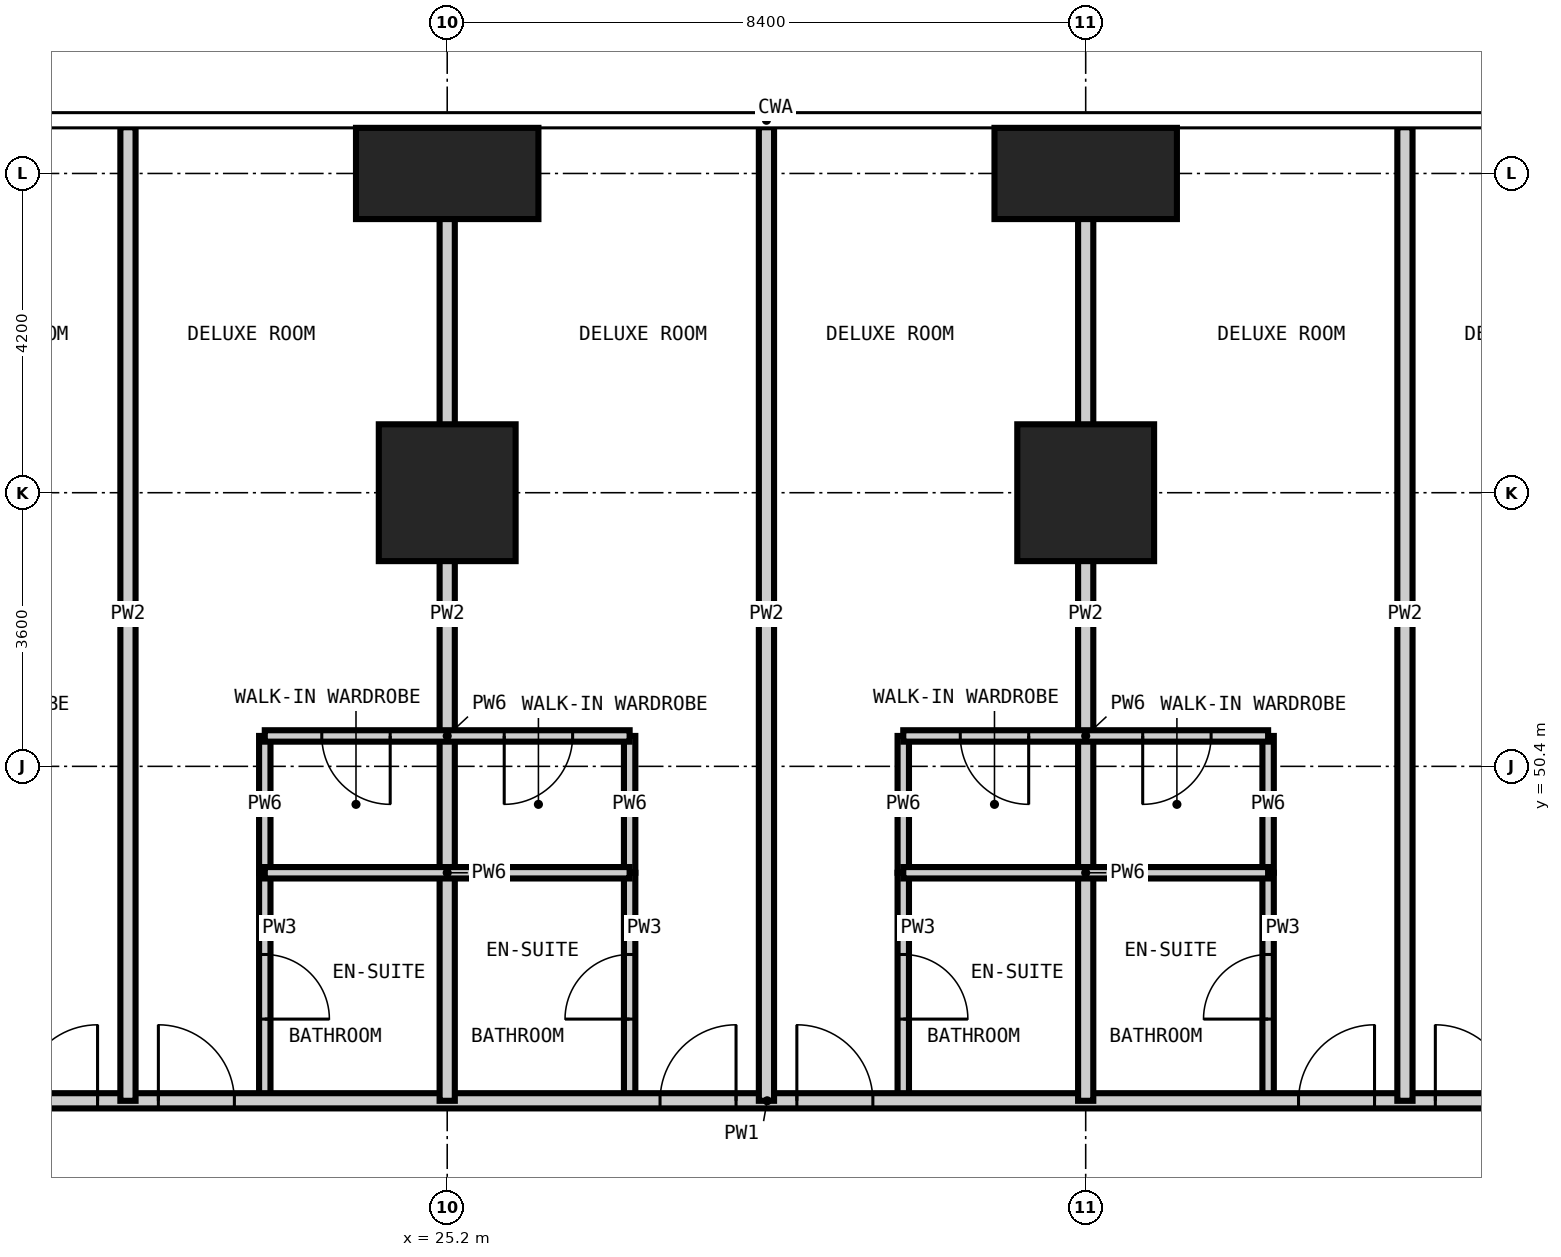
"""IFC4 building model, lengths in metres.
Left out: names, types, materials, properties, quantities, classifications, styles, units other than length and angle.
Written with IfcOpenShell. Run it as: python <this file> out.ifc"""

import sys

from ifc_helpers import new_model, si_unit, direction, frame, frame_2d, origin, origin_2d, place, context, subcontext, project, spatial, rectangle, extrude, element, fill, save


model = new_model("IFC4")
c1 = context("Model", 3, precision=1e-05, world=origin(), true_north=direction((0.0, 1.0)))
c2 = subcontext(c1, "Body", "Model", "MODEL_VIEW")
j1 = project(units=[si_unit("LENGTHUNIT", "METRE"), si_unit("PLANEANGLEUNIT", "RADIAN")], contexts=[c1])
p1 = place(None, origin())
s1 = spatial("IfcSite", under=j1, at=p1, CompositionType="ELEMENT")
p2 = place(p1, origin())
s2 = spatial("IfcBuilding", under=s1, at=p2, CompositionType="ELEMENT")
p3 = place(p2, frame((0.0, 0.0, 27.0)))
s3 = spatial("IfcBuildingStorey", under=s2, at=p3, CompositionType="ELEMENT", Elevation=27.0)
p4 = place(p3, frame((25.2, 54.0, -0.35), z_axis=(0.0, 0.0, 1.0), x_axis=(1.0, 0.0, 0.0)))
e1 = element("IfcColumn", 1, at=p4, inside=s3, PredefinedType="COLUMN", context=c2, shape_type="SweptSolid", body=[
    extrude(rectangle(XDim=1.8, YDim=1.8, at=origin_2d()), origin(), (0.0, 0.0, 1.0), 3.6),
])
p5 = place(p3, frame((25.2, 58.2, -0.35), z_axis=(0.0, 0.0, 1.0), x_axis=(1.0, 0.0, 0.0)))
e2 = element("IfcColumn", 2, at=p5, inside=s3, PredefinedType="COLUMN", context=c2, shape_type="SweptSolid", body=[
    extrude(rectangle(XDim=2.4, YDim=1.2, at=origin_2d()), origin(), (0.0, 0.0, 1.0), 3.6),
])
p6 = place(p3, frame((33.6, 54.0, -0.35), z_axis=(0.0, 0.0, 1.0), x_axis=(1.0, 0.0, 0.0)))
e3 = element("IfcColumn", 3, at=p6, inside=s3, PredefinedType="COLUMN", context=c2, shape_type="SweptSolid", body=[
    extrude(rectangle(XDim=1.8, YDim=1.8, at=origin_2d()), origin(), (0.0, 0.0, 1.0), 3.6),
])
p7 = place(p3, frame((33.6, 58.2, -0.35), z_axis=(0.0, 0.0, 1.0), x_axis=(1.0, 0.0, 0.0)))
e4 = element("IfcColumn", 4, at=p7, inside=s3, PredefinedType="COLUMN", context=c2, shape_type="SweptSolid", body=[
    extrude(rectangle(XDim=2.4, YDim=1.2, at=origin_2d()), origin(), (0.0, 0.0, 1.0), 3.6),
])
p8 = place(p3, frame((22.8, 46.0, 0.0), z_axis=(0.0, 0.0, 1.0), x_axis=(0.0, 1.0, 0.0)))
e5 = element("IfcWall", 5, at=p8, inside=s3, PredefinedType="PARTITIONING", context=c2, shape_type="SweptSolid", body=[
    extrude(rectangle(XDim=3.0, YDim=0.15, at=frame_2d((1.5, 0.0))), origin(), (0.0, 0.0, 1.0), 3.25),
])
p9 = place(p8, frame((1.075, 0.0, 0.0)))
e6 = element("IfcOpeningElement", 6, at=p9, cuts=e5, PredefinedType="OPENING", context=c2, shape_type="SweptSolid", body=[
    extrude(rectangle(XDim=0.85, YDim=2.1, at=frame_2d((0.425, 1.05))), frame((0.0, 0.085, 0.0), z_axis=(0.0, -1.0, 0.0), x_axis=(1.0, 0.0, 0.0)), (0.0, 0.0, 1.0), 0.17),
])
p10 = place(p3, frame((27.6, 46.0, 0.0), z_axis=(0.0, 0.0, 1.0), x_axis=(0.0, 1.0, 0.0)))
e7 = element("IfcWall", 7, at=p10, inside=s3, PredefinedType="PARTITIONING", context=c2, shape_type="SweptSolid", body=[
    extrude(rectangle(XDim=3.0, YDim=0.15, at=frame_2d((1.5, 0.0))), origin(), (0.0, 0.0, 1.0), 3.25),
])
p11 = place(p10, frame((1.075, 0.0, 0.0)))
e8 = element("IfcOpeningElement", 8, at=p11, cuts=e7, PredefinedType="OPENING", context=c2, shape_type="SweptSolid", body=[
    extrude(rectangle(XDim=0.85, YDim=2.1, at=frame_2d((0.425, 1.05))), frame((0.0, 0.085, 0.0), z_axis=(0.0, -1.0, 0.0), x_axis=(1.0, 0.0, 0.0)), (0.0, 0.0, 1.0), 0.17),
])
p12 = place(p3, frame((31.2, 46.0, 0.0), z_axis=(0.0, 0.0, 1.0), x_axis=(0.0, 1.0, 0.0)))
e9 = element("IfcWall", 9, at=p12, inside=s3, PredefinedType="PARTITIONING", context=c2, shape_type="SweptSolid", body=[
    extrude(rectangle(XDim=3.0, YDim=0.15, at=frame_2d((1.5, 0.0))), origin(), (0.0, 0.0, 1.0), 3.25),
])
p13 = place(p12, frame((1.075, 0.0, 0.0)))
e10 = element("IfcOpeningElement", 10, at=p13, cuts=e9, PredefinedType="OPENING", context=c2, shape_type="SweptSolid", body=[
    extrude(rectangle(XDim=0.85, YDim=2.1, at=frame_2d((0.425, 1.05))), frame((0.0, 0.085, 0.0), z_axis=(0.0, -1.0, 0.0), x_axis=(1.0, 0.0, 0.0)), (0.0, 0.0, 1.0), 0.17),
])
p14 = place(p3, frame((36.0, 46.0, 0.0), z_axis=(0.0, 0.0, 1.0), x_axis=(0.0, 1.0, 0.0)))
e11 = element("IfcWall", 11, at=p14, inside=s3, PredefinedType="PARTITIONING", context=c2, shape_type="SweptSolid", body=[
    extrude(rectangle(XDim=3.0, YDim=0.15, at=frame_2d((1.5, 0.0))), origin(), (0.0, 0.0, 1.0), 3.25),
])
p15 = place(p14, frame((1.075, 0.0, 0.0)))
e12 = element("IfcOpeningElement", 12, at=p15, cuts=e11, PredefinedType="OPENING", context=c2, shape_type="SweptSolid", body=[
    extrude(rectangle(XDim=0.85, YDim=2.1, at=frame_2d((0.425, 1.05))), frame((0.0, 0.085, 0.0), z_axis=(0.0, -1.0, 0.0), x_axis=(1.0, 0.0, 0.0)), (0.0, 0.0, 1.0), 0.17),
])
p16 = place(p3, frame((13.4, 46.0, 0.0), z_axis=(0.0, 0.0, 1.0), x_axis=(1.0, 0.0, 0.0)))
e13 = element("IfcWall", 13, at=p16, inside=s3, PredefinedType="PARTITIONING", context=c2, shape_type="SweptSolid", body=[
    extrude(rectangle(XDim=32.3, YDim=0.2, at=frame_2d((16.15, 0.0))), origin(), (0.0, 0.0, 1.0), 3.25),
])
p17 = place(p16, frame((6.2, 0.0, 0.0)))
e14 = element("IfcOpeningElement", 14, at=p17, cuts=e13, PredefinedType="OPENING", context=c2, shape_type="SweptSolid", body=[
    extrude(rectangle(XDim=1.0, YDim=2.2, at=frame_2d((0.5, 1.1))), frame((0.0, 0.11, 0.0), z_axis=(0.0, -1.0, 0.0), x_axis=(1.0, 0.0, 0.0)), (0.0, 0.0, 1.0), 0.22),
])
p18 = place(p16, frame((8.0, 0.0, 0.0)))
e15 = element("IfcOpeningElement", 15, at=p18, cuts=e13, PredefinedType="OPENING", context=c2, shape_type="SweptSolid", body=[
    extrude(rectangle(XDim=1.0, YDim=2.2, at=frame_2d((0.5, 1.1))), frame((0.0, 0.11, 0.0), z_axis=(0.0, -1.0, 0.0), x_axis=(1.0, 0.0, 0.0)), (0.0, 0.0, 1.0), 0.22),
])
p19 = place(p16, frame((14.6, 0.0, 0.0)))
e16 = element("IfcOpeningElement", 16, at=p19, cuts=e13, PredefinedType="OPENING", context=c2, shape_type="SweptSolid", body=[
    extrude(rectangle(XDim=1.0, YDim=2.2, at=frame_2d((0.5, 1.1))), frame((0.0, 0.11, 0.0), z_axis=(0.0, -1.0, 0.0), x_axis=(1.0, 0.0, 0.0)), (0.0, 0.0, 1.0), 0.22),
])
p20 = place(p16, frame((16.4, 0.0, 0.0)))
e17 = element("IfcOpeningElement", 17, at=p20, cuts=e13, PredefinedType="OPENING", context=c2, shape_type="SweptSolid", body=[
    extrude(rectangle(XDim=1.0, YDim=2.2, at=frame_2d((0.5, 1.1))), frame((0.0, 0.11, 0.0), z_axis=(0.0, -1.0, 0.0), x_axis=(1.0, 0.0, 0.0)), (0.0, 0.0, 1.0), 0.22),
])
p21 = place(p16, frame((23.0, 0.0, 0.0)))
e18 = element("IfcOpeningElement", 18, at=p21, cuts=e13, PredefinedType="OPENING", context=c2, shape_type="SweptSolid", body=[
    extrude(rectangle(XDim=1.0, YDim=2.2, at=frame_2d((0.5, 1.1))), frame((0.0, 0.11, 0.0), z_axis=(0.0, -1.0, 0.0), x_axis=(1.0, 0.0, 0.0)), (0.0, 0.0, 1.0), 0.22),
])
p22 = place(p16, frame((24.8, 0.0, 0.0)))
e19 = element("IfcOpeningElement", 19, at=p22, cuts=e13, PredefinedType="OPENING", context=c2, shape_type="SweptSolid", body=[
    extrude(rectangle(XDim=1.0, YDim=2.2, at=frame_2d((0.5, 1.1))), frame((0.0, 0.11, 0.0), z_axis=(0.0, -1.0, 0.0), x_axis=(1.0, 0.0, 0.0)), (0.0, 0.0, 1.0), 0.22),
])
for number, where, z_axis, x_axis in (
    (20, (21.0, 46.0, 0.0), (0.0, 0.0, 1.0), (0.0, 1.0, 0.0)),
    (21, (25.2, 46.0, 0.0), (0.0, 0.0, 1.0), (0.0, 1.0, 0.0)),
    (22, (29.4, 46.0, 0.0), (0.0, 0.0, 1.0), (0.0, 1.0, 0.0)),
    (23, (33.6, 46.0, 0.0), (0.0, 0.0, 1.0), (0.0, 1.0, 0.0)),
    (24, (37.8, 46.0, 0.0), (0.0, 0.0, 1.0), (0.0, 1.0, 0.0)),
):
    element("IfcWall", number, at=place(p3, frame(where, z_axis=z_axis, x_axis=x_axis)), inside=s3, PredefinedType="PARTITIONING", context=c2, shape_type="SweptSolid", body=[
        extrude(rectangle(XDim=12.808, YDim=0.2, at=frame_2d((6.404, 0.0))), origin(), (0.0, 0.0, 1.0), 3.25),
    ])
for number, where, z_axis, x_axis in (
    (25, (22.8, 49.0, 0.0), (0.0, 0.0, 1.0), (0.0, 1.0, 0.0)),
    (26, (27.6, 49.0, 0.0), (0.0, 0.0, 1.0), (0.0, 1.0, 0.0)),
    (27, (31.2, 49.0, 0.0), (0.0, 0.0, 1.0), (0.0, 1.0, 0.0)),
    (28, (36.0, 49.0, 0.0), (0.0, 0.0, 1.0), (0.0, 1.0, 0.0)),
):
    element("IfcWall", number, at=place(p3, frame(where, z_axis=z_axis, x_axis=x_axis)), inside=s3, PredefinedType="PARTITIONING", context=c2, shape_type="SweptSolid", body=[
        extrude(rectangle(XDim=1.8, YDim=0.15, at=frame_2d((0.9, 0.0))), origin(), (0.0, 0.0, 1.0), 3.25),
    ])
for number, where, z_axis, x_axis in (
    (29, (22.8, 49.0, 0.0), (0.0, 0.0, 1.0), (1.0, 0.0, 0.0)),
    (30, (31.2, 49.0, 0.0), (0.0, 0.0, 1.0), (1.0, 0.0, 0.0)),
):
    element("IfcWall", number, at=place(p3, frame(where, z_axis=z_axis, x_axis=x_axis)), inside=s3, PredefinedType="PARTITIONING", context=c2, shape_type="SweptSolid", body=[
        extrude(rectangle(XDim=4.8, YDim=0.15, at=frame_2d((2.4, 0.0))), origin(), (0.0, 0.0, 1.0), 3.25),
    ])
p23 = place(p3, frame((22.8, 50.8, 0.0), z_axis=(0.0, 0.0, 1.0), x_axis=(1.0, 0.0, 0.0)))
e31 = element("IfcWall", 31, at=p23, inside=s3, PredefinedType="PARTITIONING", context=c2, shape_type="SweptSolid", body=[
    extrude(rectangle(XDim=4.8, YDim=0.15, at=frame_2d((2.4, 0.0))), origin(), (0.0, 0.0, 1.0), 3.25),
])
p24 = place(p23, frame((0.75, 0.0, 0.0)))
e32 = element("IfcOpeningElement", 32, at=p24, cuts=e31, PredefinedType="OPENING", context=c2, shape_type="SweptSolid", body=[
    extrude(rectangle(XDim=0.9, YDim=2.1, at=frame_2d((0.45, 1.05))), frame((0.0, 0.085, 0.0), z_axis=(0.0, -1.0, 0.0), x_axis=(1.0, 0.0, 0.0)), (0.0, 0.0, 1.0), 0.17),
])
p25 = place(p23, frame((3.15, 0.0, 0.0)))
e33 = element("IfcOpeningElement", 33, at=p25, cuts=e31, PredefinedType="OPENING", context=c2, shape_type="SweptSolid", body=[
    extrude(rectangle(XDim=0.9, YDim=2.1, at=frame_2d((0.45, 1.05))), frame((0.0, 0.085, 0.0), z_axis=(0.0, -1.0, 0.0), x_axis=(1.0, 0.0, 0.0)), (0.0, 0.0, 1.0), 0.17),
])
p26 = place(p3, frame((31.2, 50.8, 0.0), z_axis=(0.0, 0.0, 1.0), x_axis=(1.0, 0.0, 0.0)))
e34 = element("IfcWall", 34, at=p26, inside=s3, PredefinedType="PARTITIONING", context=c2, shape_type="SweptSolid", body=[
    extrude(rectangle(XDim=4.8, YDim=0.15, at=frame_2d((2.4, 0.0))), origin(), (0.0, 0.0, 1.0), 3.25),
])
p27 = place(p26, frame((0.75, 0.0, 0.0)))
e35 = element("IfcOpeningElement", 35, at=p27, cuts=e34, PredefinedType="OPENING", context=c2, shape_type="SweptSolid", body=[
    extrude(rectangle(XDim=0.9, YDim=2.1, at=frame_2d((0.45, 1.05))), frame((0.0, 0.085, 0.0), z_axis=(0.0, -1.0, 0.0), x_axis=(1.0, 0.0, 0.0)), (0.0, 0.0, 1.0), 0.17),
])
p28 = place(p26, frame((3.15, 0.0, 0.0)))
e36 = element("IfcOpeningElement", 36, at=p28, cuts=e34, PredefinedType="OPENING", context=c2, shape_type="SweptSolid", body=[
    extrude(rectangle(XDim=0.9, YDim=2.1, at=frame_2d((0.45, 1.05))), frame((0.0, 0.085, 0.0), z_axis=(0.0, -1.0, 0.0), x_axis=(1.0, 0.0, 0.0)), (0.0, 0.0, 1.0), 0.17),
])
p29 = place(p17, origin())
e37 = element("IfcDoor", 37, at=p29, inside=s3, OperationType="SINGLE_SWING_RIGHT", PredefinedType="DOOR", context=c2, shape_type="SweptSolid", body=[
    extrude(rectangle(XDim=1.0, YDim=2.2, at=frame_2d((0.5, 1.1))), frame((0.0, 0.025, 0.0), z_axis=(0.0, -1.0, 0.0), x_axis=(1.0, 0.0, 0.0)), (0.0, 0.0, 1.0), 0.05),
])
fill(e14, e37)
p30 = place(p18, origin())
e38 = element("IfcDoor", 38, at=p30, inside=s3, OperationType="SINGLE_SWING_LEFT", PredefinedType="DOOR", context=c2, shape_type="SweptSolid", body=[
    extrude(rectangle(XDim=1.0, YDim=2.2, at=frame_2d((0.5, 1.1))), frame((0.0, 0.025, 0.0), z_axis=(0.0, -1.0, 0.0), x_axis=(1.0, 0.0, 0.0)), (0.0, 0.0, 1.0), 0.05),
])
fill(e15, e38)
p31 = place(p9, frame((0.85, 0.0, 0.0), z_axis=(0.0, 0.0, 1.0), x_axis=(-1.0, 0.0, 0.0)))
e39 = element("IfcDoor", 39, at=p31, inside=s3, OperationType="SINGLE_SWING_RIGHT", PredefinedType="DOOR", context=c2, shape_type="SweptSolid", body=[
    extrude(rectangle(XDim=0.85, YDim=2.1, at=frame_2d((0.425, 1.05))), frame((0.0, 0.025, 0.0), z_axis=(0.0, -1.0, 0.0), x_axis=(1.0, 0.0, 0.0)), (0.0, 0.0, 1.0), 0.05),
])
fill(e6, e39)
p32 = place(p24, frame((0.9, 0.0, 0.0), z_axis=(0.0, 0.0, 1.0), x_axis=(-1.0, 0.0, 0.0)))
e40 = element("IfcDoor", 40, at=p32, inside=s3, OperationType="SINGLE_SWING_LEFT", PredefinedType="DOOR", context=c2, shape_type="SweptSolid", body=[
    extrude(rectangle(XDim=0.9, YDim=2.1, at=frame_2d((0.45, 1.05))), frame((0.0, 0.025, 0.0), z_axis=(0.0, -1.0, 0.0), x_axis=(1.0, 0.0, 0.0)), (0.0, 0.0, 1.0), 0.05),
])
fill(e32, e40)
p33 = place(p19, origin())
e41 = element("IfcDoor", 41, at=p33, inside=s3, OperationType="SINGLE_SWING_RIGHT", PredefinedType="DOOR", context=c2, shape_type="SweptSolid", body=[
    extrude(rectangle(XDim=1.0, YDim=2.2, at=frame_2d((0.5, 1.1))), frame((0.0, 0.025, 0.0), z_axis=(0.0, -1.0, 0.0), x_axis=(1.0, 0.0, 0.0)), (0.0, 0.0, 1.0), 0.05),
])
fill(e16, e41)
p34 = place(p11, origin())
e42 = element("IfcDoor", 42, at=p34, inside=s3, OperationType="SINGLE_SWING_LEFT", PredefinedType="DOOR", context=c2, shape_type="SweptSolid", body=[
    extrude(rectangle(XDim=0.85, YDim=2.1, at=frame_2d((0.425, 1.05))), frame((0.0, 0.025, 0.0), z_axis=(0.0, -1.0, 0.0), x_axis=(1.0, 0.0, 0.0)), (0.0, 0.0, 1.0), 0.05),
])
fill(e8, e42)
p35 = place(p25, frame((0.9, 0.0, 0.0), z_axis=(0.0, 0.0, 1.0), x_axis=(-1.0, 0.0, 0.0)))
e43 = element("IfcDoor", 43, at=p35, inside=s3, OperationType="SINGLE_SWING_RIGHT", PredefinedType="DOOR", context=c2, shape_type="SweptSolid", body=[
    extrude(rectangle(XDim=0.9, YDim=2.1, at=frame_2d((0.45, 1.05))), frame((0.0, 0.025, 0.0), z_axis=(0.0, -1.0, 0.0), x_axis=(1.0, 0.0, 0.0)), (0.0, 0.0, 1.0), 0.05),
])
fill(e33, e43)
p36 = place(p20, origin())
e44 = element("IfcDoor", 44, at=p36, inside=s3, OperationType="SINGLE_SWING_LEFT", PredefinedType="DOOR", context=c2, shape_type="SweptSolid", body=[
    extrude(rectangle(XDim=1.0, YDim=2.2, at=frame_2d((0.5, 1.1))), frame((0.0, 0.025, 0.0), z_axis=(0.0, -1.0, 0.0), x_axis=(1.0, 0.0, 0.0)), (0.0, 0.0, 1.0), 0.05),
])
fill(e17, e44)
p37 = place(p13, frame((0.85, 0.0, 0.0), z_axis=(0.0, 0.0, 1.0), x_axis=(-1.0, 0.0, 0.0)))
e45 = element("IfcDoor", 45, at=p37, inside=s3, OperationType="SINGLE_SWING_RIGHT", PredefinedType="DOOR", context=c2, shape_type="SweptSolid", body=[
    extrude(rectangle(XDim=0.85, YDim=2.1, at=frame_2d((0.425, 1.05))), frame((0.0, 0.025, 0.0), z_axis=(0.0, -1.0, 0.0), x_axis=(1.0, 0.0, 0.0)), (0.0, 0.0, 1.0), 0.05),
])
fill(e10, e45)
p38 = place(p27, frame((0.9, 0.0, 0.0), z_axis=(0.0, 0.0, 1.0), x_axis=(-1.0, 0.0, 0.0)))
e46 = element("IfcDoor", 46, at=p38, inside=s3, OperationType="SINGLE_SWING_LEFT", PredefinedType="DOOR", context=c2, shape_type="SweptSolid", body=[
    extrude(rectangle(XDim=0.9, YDim=2.1, at=frame_2d((0.45, 1.05))), frame((0.0, 0.025, 0.0), z_axis=(0.0, -1.0, 0.0), x_axis=(1.0, 0.0, 0.0)), (0.0, 0.0, 1.0), 0.05),
])
fill(e35, e46)
p39 = place(p21, origin())
e47 = element("IfcDoor", 47, at=p39, inside=s3, OperationType="SINGLE_SWING_RIGHT", PredefinedType="DOOR", context=c2, shape_type="SweptSolid", body=[
    extrude(rectangle(XDim=1.0, YDim=2.2, at=frame_2d((0.5, 1.1))), frame((0.0, 0.025, 0.0), z_axis=(0.0, -1.0, 0.0), x_axis=(1.0, 0.0, 0.0)), (0.0, 0.0, 1.0), 0.05),
])
fill(e18, e47)
p40 = place(p15, origin())
e48 = element("IfcDoor", 48, at=p40, inside=s3, OperationType="SINGLE_SWING_LEFT", PredefinedType="DOOR", context=c2, shape_type="SweptSolid", body=[
    extrude(rectangle(XDim=0.85, YDim=2.1, at=frame_2d((0.425, 1.05))), frame((0.0, 0.025, 0.0), z_axis=(0.0, -1.0, 0.0), x_axis=(1.0, 0.0, 0.0)), (0.0, 0.0, 1.0), 0.05),
])
fill(e12, e48)
p41 = place(p28, frame((0.9, 0.0, 0.0), z_axis=(0.0, 0.0, 1.0), x_axis=(-1.0, 0.0, 0.0)))
e49 = element("IfcDoor", 49, at=p41, inside=s3, OperationType="SINGLE_SWING_RIGHT", PredefinedType="DOOR", context=c2, shape_type="SweptSolid", body=[
    extrude(rectangle(XDim=0.9, YDim=2.1, at=frame_2d((0.45, 1.05))), frame((0.0, 0.025, 0.0), z_axis=(0.0, -1.0, 0.0), x_axis=(1.0, 0.0, 0.0)), (0.0, 0.0, 1.0), 0.05),
])
fill(e36, e49)
p42 = place(p22, origin())
e50 = element("IfcDoor", 50, at=p42, inside=s3, OperationType="SINGLE_SWING_LEFT", PredefinedType="DOOR", context=c2, shape_type="SweptSolid", body=[
    extrude(rectangle(XDim=1.0, YDim=2.2, at=frame_2d((0.5, 1.1))), frame((0.0, 0.025, 0.0), z_axis=(0.0, -1.0, 0.0), x_axis=(1.0, 0.0, 0.0)), (0.0, 0.0, 1.0), 0.05),
])
fill(e19, e50)
save(model, sys.argv[1])
